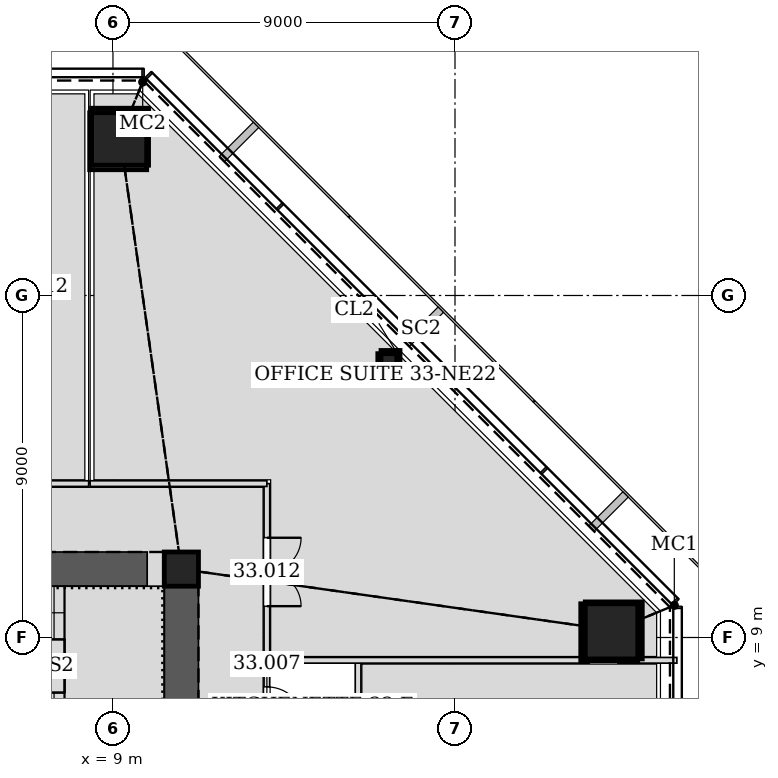
"""IFC4 building model, lengths in metres.
Left out: names, types, materials, properties, quantities, classifications, styles, units other than length and angle.
Written with IfcOpenShell. Run it as: python <this file> out.ifc"""

import sys

from ifc_helpers import new_model, si_unit, direction, frame, frame_2d, origin, origin_2d, place, context, subcontext, project, spatial, rectangle, hollow_rectangle, extrude, element, fill, save


model = new_model("IFC4")
c1 = context("Model", 3, precision=1e-05, world=origin(), true_north=direction((0.0, 1.0)))
c2 = subcontext(c1, "Body", "Model", "MODEL_VIEW")
j1 = project(units=[si_unit("LENGTHUNIT", "METRE"), si_unit("PLANEANGLEUNIT", "RADIAN")], contexts=[c1])
p1 = place(None, origin())
s1 = spatial("IfcSite", under=j1, at=p1, CompositionType="ELEMENT")
p2 = place(p1, origin())
s2 = spatial("IfcBuilding", under=s1, at=p2, CompositionType="ELEMENT")
p3 = place(p2, frame((0.0, 0.0, 147.0)))
s3 = spatial("IfcBuildingStorey", under=s2, at=p3, CompositionType="ELEMENT", Elevation=147.0)
for number, where, z_axis, x_axis in (
    (1, (22.178, 9.187, 0.0), (-0.028, -0.012, 1.0), (0.384, -0.923, 0.0)),
    (2, (9.187, 22.178, 0.0), (-0.012, -0.028, 1.0), (0.923, -0.384, 0.0)),
):
    element("IfcColumn", number, at=place(p3, frame(where, z_axis=z_axis, x_axis=x_axis)), inside=s3, PredefinedType="COLUMN", context=c2, shape_type="SweptSolid", body=[
        extrude(hollow_rectangle(XDim=1.5, YDim=1.5, WallThickness=0.07, at=origin_2d()), origin(), (0.0, 0.0, 1.0), 4.202),
    ])
p4 = place(p3, frame((16.303, 16.303, 0.0), z_axis=(-0.019988521213, -0.019988521213, 0.999600379171), x_axis=(0.707106781187, -0.707106781187, 0.0)))
e3 = element("IfcColumn", 3, at=p4, inside=s3, PredefinedType="COLUMN", context=c2, shape_type="SweptSolid", body=[
    extrude(hollow_rectangle(XDim=0.5, YDim=0.5, WallThickness=0.025, at=origin_2d()), origin(), (0.0, 0.0, 1.0), 4.202),
])
p5 = place(p3, frame((10.8, 10.8, 0.0), z_axis=(0.0, 0.0, 1.0), x_axis=(1.0, 0.0, 0.0)))
e4 = element("IfcColumn", 4, at=p5, inside=s3, PredefinedType="COLUMN", context=c2, shape_type="SweptSolid", body=[
    extrude(hollow_rectangle(XDim=0.9, YDim=0.9, WallThickness=0.06, at=origin_2d()), origin(), (0.0, 0.0, 1.0), 4.2),
])
p6 = place(p3, frame((10.8, -10.8, 0.0), z_axis=(0.0, 0.0, 1.0), x_axis=(0.0, 1.0, 0.0)))
e5 = element("IfcWall", 5, at=p6, inside=s3, PredefinedType="SOLIDWALL", context=c2, shape_type="SweptSolid", body=[
    extrude(rectangle(XDim=21.6, YDim=0.9, at=frame_2d((10.8, 0.0))), origin(), (0.0, 0.0, 1.0), 4.2),
])
p7 = place(p6, frame((11.7, 0.0, 0.0)))
e6 = element("IfcOpeningElement", 6, at=p7, cuts=e5, PredefinedType="OPENING", context=c2, shape_type="SweptSolid", body=[
    extrude(rectangle(XDim=1.2, YDim=2.1, at=frame_2d((0.6, 1.05))), frame((0.0, 0.46, 0.0), z_axis=(0.0, -1.0, 0.0), x_axis=(1.0, 0.0, 0.0)), (0.0, 0.0, 1.0), 0.92),
])
p8 = place(p6, frame((8.7, 0.0, 0.0)))
e7 = element("IfcOpeningElement", 7, at=p8, cuts=e5, PredefinedType="OPENING", context=c2, shape_type="SweptSolid", body=[
    extrude(rectangle(XDim=1.2, YDim=2.1, at=frame_2d((0.6, 1.05))), frame((0.0, 0.46, 0.0), z_axis=(0.0, -1.0, 0.0), x_axis=(1.0, 0.0, 0.0)), (0.0, 0.0, 1.0), 0.92),
])
p9 = place(p3, frame((10.8, 10.8, 0.0), z_axis=(0.0, 0.0, 1.0), x_axis=(-1.0, 0.0, 0.0)))
e8 = element("IfcWall", 8, at=p9, inside=s3, PredefinedType="SOLIDWALL", context=c2, shape_type="SweptSolid", body=[
    extrude(rectangle(XDim=21.6, YDim=0.9, at=frame_2d((10.8, 0.0))), origin(), (0.0, 0.0, 1.0), 4.2),
])
p10 = place(p9, frame((10.05, 0.0, 0.0)))
e9 = element("IfcOpeningElement", 9, at=p10, cuts=e8, PredefinedType="OPENING", context=c2, shape_type="SweptSolid", body=[
    extrude(rectangle(XDim=1.5, YDim=2.1, at=frame_2d((0.75, 1.05))), frame((0.0, 0.46, 0.0), z_axis=(0.0, -1.0, 0.0), x_axis=(1.0, 0.0, 0.0)), (0.0, 0.0, 1.0), 0.92),
])
p11 = place(p3, frame((13.05, 5.999, 0.0), z_axis=(0.0, 0.0, 1.0), x_axis=(0.0, 1.0, 0.0)))
e10 = element("IfcWall", 10, at=p11, inside=s3, PredefinedType="PARTITIONING", context=c2, shape_type="SweptSolid", body=[
    extrude(rectangle(XDim=2.402, YDim=0.15, at=frame_2d((1.201, 0.0))), origin(), (0.0, 0.0, 1.0), 4.035),
])
p12 = place(p11, frame((0.701, 0.0, 0.0)))
e11 = element("IfcOpeningElement", 11, at=p12, cuts=e10, PredefinedType="OPENING", context=c2, shape_type="SweptSolid", body=[
    extrude(rectangle(XDim=1.0, YDim=2.1, at=frame_2d((0.5, 1.05))), frame((0.0, 0.085, 0.0), z_axis=(0.0, -1.0, 0.0), x_axis=(1.0, 0.0, 0.0)), (0.0, 0.0, 1.0), 0.17),
])
p13 = place(p3, frame((8.361, 13.05, 0.0), z_axis=(0.0, 0.0, 1.0), x_axis=(-1.0, 0.0, 0.0)))
e12 = element("IfcWall", 12, at=p13, inside=s3, PredefinedType="PARTITIONING", context=c2, shape_type="SweptSolid", body=[
    extrude(rectangle(XDim=7.461, YDim=0.15, at=frame_2d((3.73, 0.0))), origin(), (0.0, 0.0, 1.0), 4.035),
])
p14 = place(p3, frame((13.05, 8.399, 0.0), z_axis=(0.0, 0.0, 1.0), x_axis=(0.0, 1.0, 0.0)))
e13 = element("IfcWall", 13, at=p14, inside=s3, PredefinedType="PARTITIONING", context=c2, shape_type="SweptSolid", body=[
    extrude(rectangle(XDim=4.651, YDim=0.15, at=frame_2d((2.326, 0.0))), origin(), (0.0, 0.0, 1.0), 3.098),
])
p15 = place(p14, frame((1.426, 0.0, 0.0)))
e14 = element("IfcOpeningElement", 14, at=p15, cuts=e13, PredefinedType="OPENING", context=c2, shape_type="SweptSolid", body=[
    extrude(rectangle(XDim=1.8, YDim=2.4, at=frame_2d((0.9, 1.2))), frame((0.0, 0.085, 0.0), z_axis=(0.0, -1.0, 0.0), x_axis=(1.0, 0.0, 0.0)), (0.0, 0.0, 1.0), 0.17),
])
p16 = place(p3, frame((13.05, 13.05, 0.0), z_axis=(0.0, 0.0, 1.0), x_axis=(-1.0, 0.0, 0.0)))
e15 = element("IfcWall", 15, at=p16, inside=s3, PredefinedType="PARTITIONING", context=c2, shape_type="SweptSolid", body=[
    extrude(rectangle(XDim=4.651, YDim=0.15, at=frame_2d((2.326, 0.0))), origin(), (0.0, 0.0, 1.0), 3.098),
])
p17 = place(p3, frame((15.45, 6.0, 0.0), z_axis=(0.0, 0.0, 1.0), x_axis=(0.0, 1.0, 0.0)))
e16 = element("IfcWall", 16, at=p17, inside=s3, PredefinedType="PARTITIONING", context=c2, shape_type="SweptSolid", body=[
    extrude(rectangle(XDim=2.4, YDim=0.15, at=frame_2d((1.2, 0.0))), origin(), (0.0, 0.0, 1.0), 4.035),
])
p18 = place(p3, frame((13.05, 8.4, 0.0), z_axis=(0.0, 0.0, 1.0), x_axis=(1.0, 0.0, 0.0)))
e17 = element("IfcWall", 17, at=p18, inside=s3, PredefinedType="PARTITIONING", context=c2, shape_type="SweptSolid", body=[
    extrude(rectangle(XDim=8.482, YDim=0.15, at=frame_2d((4.241, 0.0))), origin(), (0.0, 0.0, 1.0), 3.426),
])
p19 = place(p3, frame((23.838, 8.4, 0.0), z_axis=(0.0, 0.0, 1.0), x_axis=(-1.0, 0.0, 0.0)))
e18 = element("IfcWall", 18, at=p19, inside=s3, PredefinedType="PARTITIONING", context=c2, shape_type="SweptSolid", body=[
    extrude(rectangle(XDim=1.55, YDim=0.15, at=frame_2d((0.775, 0.0))), origin(), (0.0, 0.0, 1.0), 4.035),
])
p20 = place(p12, frame((1.0, 0.0, 0.0), z_axis=(0.0, 0.0, 1.0), x_axis=(-1.0, 0.0, 0.0)))
e19 = element("IfcDoor", 19, at=p20, inside=s3, OperationType="SINGLE_SWING_RIGHT", PredefinedType="DOOR", context=c2, shape_type="SweptSolid", body=[
    extrude(rectangle(XDim=1.0, YDim=2.1, at=frame_2d((0.5, 1.05))), frame((0.0, 0.025, 0.0), z_axis=(0.0, -1.0, 0.0), x_axis=(1.0, 0.0, 0.0)), (0.0, 0.0, 1.0), 0.05),
])
fill(e11, e19)
p21 = place(p15, frame((1.8, 0.0, 0.0), z_axis=(0.0, 0.0, 1.0), x_axis=(-1.0, 0.0, 0.0)))
e20 = element("IfcDoor", 20, at=p21, inside=s3, OperationType="DOUBLE_DOOR_SINGLE_SWING", PredefinedType="DOOR", context=c2, shape_type="SweptSolid", body=[
    extrude(rectangle(XDim=1.8, YDim=2.4, at=frame_2d((0.9, 1.2))), frame((0.0, 0.025, 0.0), z_axis=(0.0, -1.0, 0.0), x_axis=(1.0, 0.0, 0.0)), (0.0, 0.0, 1.0), 0.05),
])
fill(e14, e20)
save(model, sys.argv[1])
